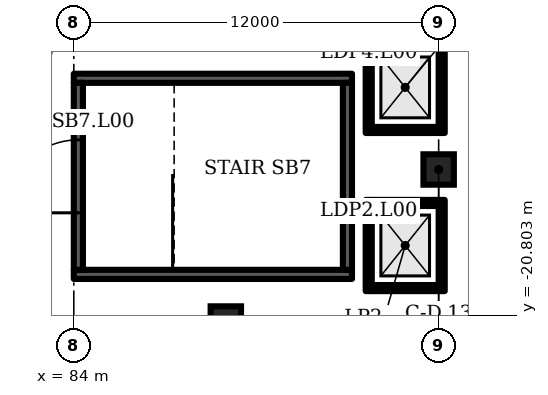
"""IFC4 building model, lengths in metres.
Left out: names, types, materials, properties, quantities, classifications, styles, units other than length and angle.
Written with IfcOpenShell. Run it as: python <this file> out.ifc"""

import sys

from ifc_helpers import new_model, si_unit, direction, frame, frame_2d, origin, origin_2d, place, context, subcontext, project, spatial, rectangle, extrude, element, fill, save


model = new_model("IFC4")
c1 = context("Model", 3, precision=1e-05, world=origin(), true_north=direction((0.0, 1.0)))
c2 = subcontext(c1, "Body", "Model", "MODEL_VIEW")
j1 = project(units=[si_unit("LENGTHUNIT", "METRE"), si_unit("PLANEANGLEUNIT", "RADIAN")], contexts=[c1])
p1 = place(None, origin())
s1 = spatial("IfcSite", under=j1, at=p1, CompositionType="ELEMENT")
p2 = place(p1, origin())
s2 = spatial("IfcBuilding", under=s1, at=p2, CompositionType="ELEMENT")
p3 = place(p2, origin())
s3 = spatial("IfcBuildingStorey", under=s2, at=p3, CompositionType="ELEMENT", Elevation=0.0)
for number, where, z_axis, x_axis in (
    (1, (96.0, -16.0, 0.0), (0.0, 0.0, 1.0), (1.0, 0.0, 0.0)),
    (2, (89.0, -21.0, 0.0), (0.0, 0.0, 1.0), (1.0, 0.0, 0.0)),
):
    element("IfcColumn", number, at=place(p3, frame(where, z_axis=z_axis, x_axis=x_axis)), inside=s3, PredefinedType="COLUMN", context=c2, shape_type="SweptSolid", body=[
        extrude(rectangle(XDim=1.0, YDim=1.0, at=origin_2d()), origin(), (0.0, 0.0, 1.0), 8.0),
    ])
for number, where, z_axis, x_axis in (
    (3, (84.0, -19.45, 0.0), (0.0, 0.0, 1.0), (1.0, 0.0, 0.0)),
    (4, (84.0, -13.0, 0.0), (0.0, 0.0, 1.0), (1.0, 0.0, 0.0)),
):
    element("IfcWall", number, at=place(p3, frame(where, z_axis=z_axis, x_axis=x_axis)), inside=s3, PredefinedType="SHEAR", context=c2, shape_type="SweptSolid", body=[
        extrude(rectangle(XDim=9.15, YDim=0.3, at=frame_2d((4.575, 0.0))), origin(), (0.0, 0.0, 1.0), 7.7),
    ])
p4 = place(p3, frame((84.15, -19.3, 0.0), z_axis=(0.0, 0.0, 1.0), x_axis=(0.0, 1.0, 0.0)))
e5 = element("IfcWall", 5, at=p4, inside=s3, PredefinedType="SHEAR", context=c2, shape_type="SweptSolid", body=[
    extrude(rectangle(XDim=6.15, YDim=0.3, at=frame_2d((3.075, 0.0))), origin(), (0.0, 0.0, 1.0), 7.7),
])
p5 = place(p4, frame((1.875, 0.0, 0.0)))
e6 = element("IfcOpeningElement", 6, at=p5, cuts=e5, PredefinedType="OPENING", context=c2, shape_type="SweptSolid", body=[
    extrude(rectangle(XDim=2.4, YDim=2.1, at=frame_2d((1.2, 1.05))), frame((0.0, 0.16, 0.0), z_axis=(0.0, -1.0, 0.0), x_axis=(1.0, 0.0, 0.0)), (0.0, 0.0, 1.0), 0.32),
])
p6 = place(p3, frame((93.0, -19.3, 0.0), z_axis=(0.0, 0.0, 1.0), x_axis=(0.0, 1.0, 0.0)))
e7 = element("IfcWall", 7, at=p6, inside=s3, PredefinedType="SHEAR", context=c2, shape_type="SweptSolid", body=[
    extrude(rectangle(XDim=6.15, YDim=0.3, at=frame_2d((3.075, 0.0))), origin(), (0.0, 0.0, 1.0), 7.7),
])
p7 = place(p3, frame((93.7, -20.0, 0.0), z_axis=(0.0, 0.0, 1.0), x_axis=(0.0, 1.0, 0.0)))
e8 = element("IfcWall", 8, at=p7, inside=s3, PredefinedType="PARTITIONING", context=c2, shape_type="SweptSolid", body=[
    extrude(rectangle(XDim=3.0, YDim=0.2, at=frame_2d((1.5, 0.0))), origin(), (0.0, 0.0, 1.0), 7.7),
])
p8 = place(p7, frame((0.95, 0.0, 0.0)))
e9 = element("IfcOpeningElement", 9, at=p8, cuts=e8, PredefinedType="OPENING", context=c2, shape_type="SweptSolid", body=[
    extrude(rectangle(XDim=1.1, YDim=2.1, at=frame_2d((0.55, 1.05))), frame((0.0, 0.11, 0.0), z_axis=(0.0, -1.0, 0.0), x_axis=(1.0, 0.0, 0.0)), (0.0, 0.0, 1.0), 0.22),
])
p9 = place(p3, frame((96.1, -20.0, 0.0), z_axis=(0.0, 0.0, 1.0), x_axis=(0.0, 1.0, 0.0)))
e10 = element("IfcWall", 10, at=p9, inside=s3, PredefinedType="PARTITIONING", context=c2, shape_type="SweptSolid", body=[
    extrude(rectangle(XDim=3.0, YDim=0.2, at=frame_2d((1.5, 0.0))), origin(), (0.0, 0.0, 1.0), 7.7),
])
for number, where, z_axis, x_axis in (
    (11, (93.8, -19.9, 0.0), (0.0, 0.0, 1.0), (1.0, 0.0, 0.0)),
    (12, (93.8, -17.1, 0.0), (0.0, 0.0, 1.0), (1.0, 0.0, 0.0)),
):
    element("IfcWall", number, at=place(p3, frame(where, z_axis=z_axis, x_axis=x_axis)), inside=s3, PredefinedType="PARTITIONING", context=c2, shape_type="SweptSolid", body=[
        extrude(rectangle(XDim=2.2, YDim=0.2, at=frame_2d((1.1, 0.0))), origin(), (0.0, 0.0, 1.0), 7.7),
    ])
p10 = place(p3, frame((93.7, -14.8, 0.0), z_axis=(0.0, 0.0, 1.0), x_axis=(0.0, 1.0, 0.0)))
e13 = element("IfcWall", 13, at=p10, inside=s3, PredefinedType="PARTITIONING", context=c2, shape_type="SweptSolid", body=[
    extrude(rectangle(XDim=3.0, YDim=0.2, at=frame_2d((1.5, 0.0))), origin(), (0.0, 0.0, 1.0), 7.7),
])
p11 = place(p10, frame((0.95, 0.0, 0.0)))
e14 = element("IfcOpeningElement", 14, at=p11, cuts=e13, PredefinedType="OPENING", context=c2, shape_type="SweptSolid", body=[
    extrude(rectangle(XDim=1.1, YDim=2.1, at=frame_2d((0.55, 1.05))), frame((0.0, 0.11, 0.0), z_axis=(0.0, -1.0, 0.0), x_axis=(1.0, 0.0, 0.0)), (0.0, 0.0, 1.0), 0.22),
])
p12 = place(p3, frame((96.1, -14.8, 0.0), z_axis=(0.0, 0.0, 1.0), x_axis=(0.0, 1.0, 0.0)))
e15 = element("IfcWall", 15, at=p12, inside=s3, PredefinedType="PARTITIONING", context=c2, shape_type="SweptSolid", body=[
    extrude(rectangle(XDim=3.0, YDim=0.2, at=frame_2d((1.5, 0.0))), origin(), (0.0, 0.0, 1.0), 7.7),
])
p13 = place(p3, frame((93.8, -14.7, 0.0), z_axis=(0.0, 0.0, 1.0), x_axis=(1.0, 0.0, 0.0)))
e16 = element("IfcWall", 16, at=p13, inside=s3, PredefinedType="PARTITIONING", context=c2, shape_type="SweptSolid", body=[
    extrude(rectangle(XDim=2.2, YDim=0.2, at=frame_2d((1.1, 0.0))), origin(), (0.0, 0.0, 1.0), 7.7),
])
p14 = place(p5, origin())
e17 = element("IfcDoor", 17, at=p14, inside=s3, OperationType="DOUBLE_DOOR_SINGLE_SWING", PredefinedType="DOOR", context=c2, shape_type="SweptSolid", body=[
    extrude(rectangle(XDim=2.4, YDim=2.1, at=frame_2d((1.2, 1.05))), frame((0.0, 0.025, 0.0), z_axis=(0.0, -1.0, 0.0), x_axis=(1.0, 0.0, 0.0)), (0.0, 0.0, 1.0), 0.05),
])
fill(e6, e17)
p15 = place(p8, origin())
e18 = element("IfcDoor", 18, at=p15, inside=s3, OperationType="DOUBLE_DOOR_SLIDING", PredefinedType="DOOR", context=c2, shape_type="SweptSolid", body=[
    extrude(rectangle(XDim=1.1, YDim=2.1, at=frame_2d((0.55, 1.05))), frame((0.0, 0.025, 0.0), z_axis=(0.0, -1.0, 0.0), x_axis=(1.0, 0.0, 0.0)), (0.0, 0.0, 1.0), 0.05),
])
fill(e9, e18)
p16 = place(p11, origin())
e19 = element("IfcDoor", 19, at=p16, inside=s3, OperationType="DOUBLE_DOOR_SLIDING", PredefinedType="DOOR", context=c2, shape_type="SweptSolid", body=[
    extrude(rectangle(XDim=1.1, YDim=2.1, at=frame_2d((0.55, 1.05))), frame((0.0, 0.025, 0.0), z_axis=(0.0, -1.0, 0.0), x_axis=(1.0, 0.0, 0.0)), (0.0, 0.0, 1.0), 0.05),
])
fill(e14, e19)
save(model, sys.argv[1])
